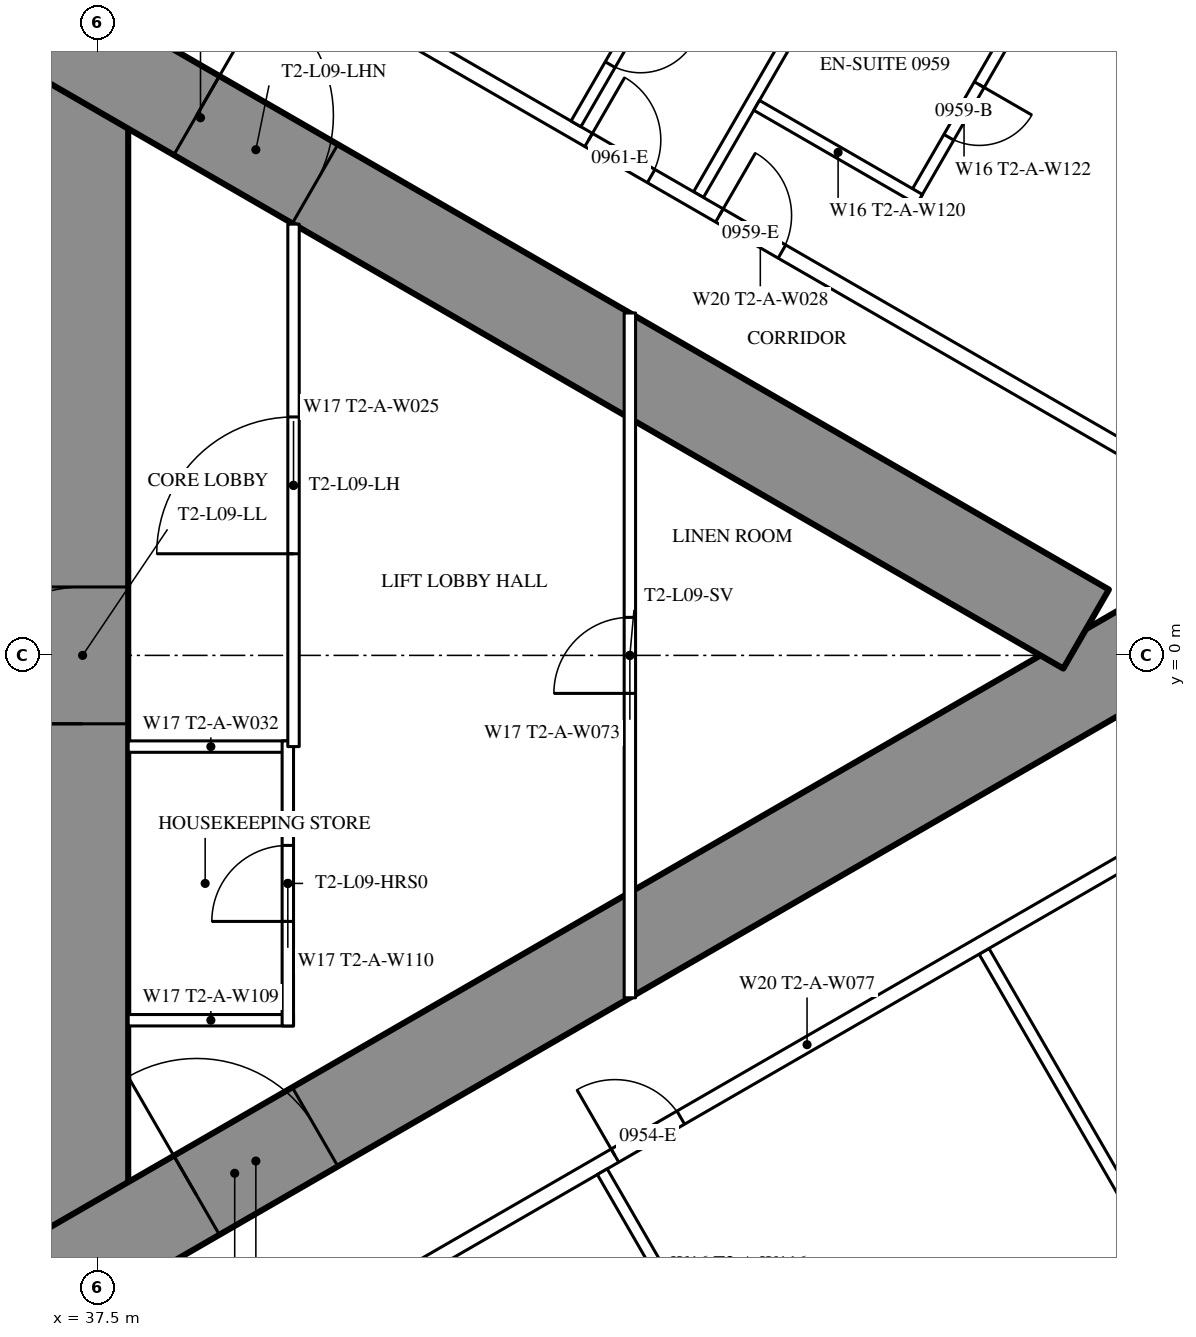
"""IFC4 building model, lengths in metres.
Left out: names, types, materials, properties, quantities, classifications, styles, units other than length and angle.
Written with IfcOpenShell. Run it as: python <this file> out.ifc"""

import sys

from ifc_helpers import new_model, si_unit, direction, frame, frame_2d, origin, place, context, subcontext, project, spatial, rectangle, extrude, element, fill, save


model = new_model("IFC4")
c1 = context("Model", 3, precision=1e-05, world=origin(), true_north=direction((0.0, 1.0)))
c2 = subcontext(c1, "Body", "Model", "MODEL_VIEW")
j1 = project(units=[si_unit("LENGTHUNIT", "METRE"), si_unit("PLANEANGLEUNIT", "RADIAN")], contexts=[c1])
p1 = place(None, origin())
s1 = spatial("IfcSite", under=j1, at=p1, CompositionType="ELEMENT")
p2 = place(p1, origin())
s2 = spatial("IfcBuilding", under=s1, at=p2, CompositionType="ELEMENT")
p3 = place(p2, frame((0.0, 0.0, 39.0)))
s3 = spatial("IfcBuildingStorey", under=s2, at=p3, CompositionType="ELEMENT", Elevation=39.0)
p4 = place(p3, frame((37.3, -8.6, 0.0), z_axis=(0.0, 0.0, 1.0), x_axis=(0.0, 1.0, 0.0)))
e1 = element("IfcWall", 1, at=p4, inside=s3, PredefinedType="SHEAR", context=c2, shape_type="SweptSolid", body=[
    extrude(rectangle(XDim=17.2, YDim=1.2, at=frame_2d((8.6, 0.0))), origin(), (0.0, 0.0, 1.0), 3.5),
])
p5 = place(p4, frame((7.7, 0.0, 0.0)))
e2 = element("IfcOpeningElement", 2, at=p5, cuts=e1, PredefinedType="OPENING", context=c2, shape_type="SweptSolid", body=[
    extrude(rectangle(XDim=1.8, YDim=2.2, at=frame_2d((0.9, 1.1))), frame((0.0, 0.61, 0.0), z_axis=(0.0, -1.0, 0.0), x_axis=(1.0, 0.0, 0.0)), (0.0, 0.0, 1.0), 1.22),
])
p6 = place(p3, frame((27.2, -13.8, 0.0), z_axis=(0.0, 0.0, 1.0), x_axis=(0.866027159892, 0.499996958321, 0.0)))
e3 = element("IfcWall", 3, at=p6, inside=s3, PredefinedType="SHEAR", context=c2, shape_type="SweptSolid", body=[
    extrude(rectangle(XDim=27.947, YDim=1.2, at=frame_2d((13.973, 0.0))), origin(), (0.0, 0.0, 1.0), 3.5),
])
p7 = place(p6, frame((4.6, 0.0, 0.0)))
e4 = element("IfcOpeningElement", 4, at=p7, cuts=e3, PredefinedType="OPENING", context=c2, shape_type="SweptSolid", body=[
    extrude(rectangle(XDim=1.0, YDim=2.2, at=frame_2d((0.5, 1.1))), frame((0.0, 0.61, 0.0), z_axis=(0.0, -1.0, 0.0), x_axis=(1.0, 0.0, 0.0)), (0.0, 0.0, 1.0), 1.22),
])
p8 = place(p6, frame((13.395, 0.0, 0.0)))
e5 = element("IfcOpeningElement", 5, at=p8, cuts=e3, PredefinedType="OPENING", context=c2, shape_type="SweptSolid", body=[
    extrude(rectangle(XDim=1.8, YDim=2.2, at=frame_2d((0.9, 1.1))), frame((0.0, 0.61, 0.0), z_axis=(0.0, -1.0, 0.0), x_axis=(1.0, 0.0, 0.0)), (0.0, 0.0, 1.0), 1.22),
])
p9 = place(p3, frame((27.2, 13.8, 0.0), z_axis=(0.0, 0.0, 1.0), x_axis=(0.866024515034, -0.500001539357, 0.0)))
e6 = element("IfcWall", 6, at=p9, inside=s3, PredefinedType="SHEAR", context=c2, shape_type="SweptSolid", body=[
    extrude(rectangle(XDim=26.907, YDim=1.2, at=frame_2d((13.454, 0.0))), origin(), (0.0, 0.0, 1.0), 3.5),
])
p10 = place(p9, frame((4.6, 0.0, 0.0)))
e7 = element("IfcOpeningElement", 7, at=p10, cuts=e6, PredefinedType="OPENING", context=c2, shape_type="SweptSolid", body=[
    extrude(rectangle(XDim=1.0, YDim=2.2, at=frame_2d((0.5, 1.1))), frame((0.0, 0.61, 0.0), z_axis=(0.0, -1.0, 0.0), x_axis=(1.0, 0.0, 0.0)), (0.0, 0.0, 1.0), 1.22),
])
p11 = place(p9, frame((13.395, 0.0, 0.0)))
e8 = element("IfcOpeningElement", 8, at=p11, cuts=e6, PredefinedType="OPENING", context=c2, shape_type="SweptSolid", body=[
    extrude(rectangle(XDim=1.8, YDim=2.2, at=frame_2d((0.9, 1.1))), frame((0.0, 0.61, 0.0), z_axis=(0.0, -1.0, 0.0), x_axis=(1.0, 0.0, 0.0)), (0.0, 0.0, 1.0), 1.22),
])
p12 = place(p3, frame((49.159, -3.893, 0.0), z_axis=(0.0, 0.0, 1.0), x_axis=(0.499998773722, -0.866026111775, 0.0)))
e9 = element("IfcWall", 9, at=p12, inside=s3, PredefinedType="PARTITIONING", context=c2, shape_type="SweptSolid", body=[
    extrude(rectangle(XDim=9.892, YDim=0.15, at=frame_2d((4.946, 0.0))), origin(), (0.0, 0.0, 1.0), 2.25),
])
p13 = place(p3, frame((45.403, 6.062, 0.0), z_axis=(0.0, 0.0, 1.0), x_axis=(0.500013434677, 0.866017647131, 0.0)))
e10 = element("IfcWall", 10, at=p13, inside=s3, PredefinedType="PARTITIONING", context=c2, shape_type="SweptSolid", body=[
    extrude(rectangle(XDim=9.902, YDim=0.15, at=frame_2d((4.951, 0.0))), origin(), (0.0, 0.0, 1.0), 2.25),
])
p14 = place(p3, frame((37.96, -10.243, 0.0), z_axis=(0.0, 0.0, 1.0), x_axis=(0.866026429433, 0.499998223521, 0.0)))
e11 = element("IfcWall", 11, at=p14, inside=s3, PredefinedType="PARTITIONING", context=c2, shape_type="SweptSolid", body=[
    extrude(rectangle(XDim=20.487, YDim=0.2, at=frame_2d((10.243, 0.0))), origin(), (0.0, 0.0, 1.0), 3.25),
])
p15 = place(p14, frame((7.325, 0.0, 0.0)))
e12 = element("IfcOpeningElement", 12, at=p15, cuts=e11, PredefinedType="OPENING", context=c2, shape_type="SweptSolid", body=[
    extrude(rectangle(XDim=1.0, YDim=2.2, at=frame_2d((0.5, 1.1))), frame((0.0, 0.11, 0.0), z_axis=(0.0, -1.0, 0.0), x_axis=(1.0, 0.0, 0.0)), (0.0, 0.0, 1.0), 0.22),
])
p16 = place(p14, frame((18.937, 0.0, 0.0)))
e13 = element("IfcOpeningElement", 13, at=p16, cuts=e11, PredefinedType="OPENING", context=c2, shape_type="SweptSolid", body=[
    extrude(rectangle(XDim=0.95, YDim=2.2, at=frame_2d((0.475, 1.1))), frame((0.0, 0.11, 0.0), z_axis=(0.0, -1.0, 0.0), x_axis=(1.0, 0.0, 0.0)), (0.0, 0.0, 1.0), 0.22),
])
p17 = place(p14, frame((0.6, 0.0, 0.0)))
e14 = element("IfcOpeningElement", 14, at=p17, cuts=e11, PredefinedType="OPENING", context=c2, shape_type="SweptSolid", body=[
    extrude(rectangle(XDim=0.95, YDim=2.2, at=frame_2d((0.475, 1.1))), frame((0.0, 0.11, 0.0), z_axis=(0.0, -1.0, 0.0), x_axis=(1.0, 0.0, 0.0)), (0.0, 0.0, 1.0), 0.22),
])
p18 = place(p3, frame((36.834, 10.894, 0.0), z_axis=(0.0, 0.0, 1.0), x_axis=(0.866028157229, -0.499995230863, 0.0)))
e15 = element("IfcWall", 15, at=p18, inside=s3, PredefinedType="PARTITIONING", context=c2, shape_type="SweptSolid", body=[
    extrude(rectangle(XDim=21.667, YDim=0.2, at=frame_2d((10.833, 0.0))), origin(), (0.0, 0.0, 1.0), 3.25),
])
p19 = place(p18, frame((18.885, 0.0, 0.0)))
e16 = element("IfcOpeningElement", 16, at=p19, cuts=e15, PredefinedType="OPENING", context=c2, shape_type="SweptSolid", body=[
    extrude(rectangle(XDim=0.95, YDim=2.2, at=frame_2d((0.475, 1.1))), frame((0.0, 0.11, 0.0), z_axis=(0.0, -1.0, 0.0), x_axis=(1.0, 0.0, 0.0)), (0.0, 0.0, 1.0), 0.22),
])
p20 = place(p18, frame((10.212, 0.0, 0.0)))
e17 = element("IfcOpeningElement", 17, at=p20, cuts=e15, PredefinedType="OPENING", context=c2, shape_type="SweptSolid", body=[
    extrude(rectangle(XDim=0.95, YDim=2.2, at=frame_2d((0.475, 1.1))), frame((0.0, 0.11, 0.0), z_axis=(0.0, -1.0, 0.0), x_axis=(1.0, 0.0, 0.0)), (0.0, 0.0, 1.0), 0.22),
])
p21 = place(p18, frame((8.225, 0.0, 0.0)))
e18 = element("IfcOpeningElement", 18, at=p21, cuts=e15, PredefinedType="OPENING", context=c2, shape_type="SweptSolid", body=[
    extrude(rectangle(XDim=0.95, YDim=2.2, at=frame_2d((0.475, 1.1))), frame((0.0, 0.11, 0.0), z_axis=(0.0, -1.0, 0.0), x_axis=(1.0, 0.0, 0.0)), (0.0, 0.0, 1.0), 0.22),
])
p22 = place(p18, frame((1.825, 0.0, 0.0)))
e19 = element("IfcOpeningElement", 19, at=p22, cuts=e15, PredefinedType="OPENING", context=c2, shape_type="SweptSolid", body=[
    extrude(rectangle(XDim=0.95, YDim=2.2, at=frame_2d((0.475, 1.1))), frame((0.0, 0.11, 0.0), z_axis=(0.0, -1.0, 0.0), x_axis=(1.0, 0.0, 0.0)), (0.0, 0.0, 1.0), 0.22),
])
p23 = place(p18, frame((0.246, 0.0, 0.0)))
e20 = element("IfcOpeningElement", 20, at=p23, cuts=e15, PredefinedType="OPENING", context=c2, shape_type="SweptSolid", body=[
    extrude(rectangle(XDim=0.9, YDim=2.2, at=frame_2d((0.45, 1.1))), frame((0.0, 0.11, 0.0), z_axis=(0.0, -1.0, 0.0), x_axis=(1.0, 0.0, 0.0)), (0.0, 0.0, 1.0), 0.22),
])
p24 = place(p3, frame((44.137, -6.792, 0.0), z_axis=(0.0, 0.0, 1.0), x_axis=(0.49994636267, -0.866056369097, 0.0)))
e21 = element("IfcWall", 21, at=p24, inside=s3, PredefinedType="PARTITIONING", context=c2, shape_type="SweptSolid", body=[
    extrude(rectangle(XDim=2.8, YDim=0.15, at=frame_2d((1.4, 0.0))), origin(), (0.0, 0.0, 1.0), 3.25),
])
p25 = place(p24, frame((1.55, 0.0, 0.0)))
e22 = element("IfcOpeningElement", 22, at=p25, cuts=e21, PredefinedType="OPENING", context=c2, shape_type="SweptSolid", body=[
    extrude(rectangle(XDim=1.0, YDim=2.2, at=frame_2d((0.5, 1.1))), frame((0.0, 0.085, 0.0), z_axis=(0.0, -1.0, 0.0), x_axis=(1.0, 0.0, 0.0)), (0.0, 0.0, 1.0), 0.17),
])
p26 = place(p3, frame((48.246, 6.037, 0.0), z_axis=(0.0, 0.0, 1.0), x_axis=(0.500006934395, 0.866021400173, 0.0)))
e23 = element("IfcWall", 23, at=p26, inside=s3, PredefinedType="PARTITIONING", context=c2, shape_type="SweptSolid", body=[
    extrude(rectangle(XDim=2.6, YDim=0.15, at=frame_2d((1.3, 0.0))), origin(), (0.0, 0.0, 1.0), 3.25),
])
p27 = place(p26, frame((0.9, 0.0, 0.0)))
e24 = element("IfcOpeningElement", 24, at=p27, cuts=e23, PredefinedType="OPENING", context=c2, shape_type="SweptSolid", body=[
    extrude(rectangle(XDim=0.8, YDim=2.2, at=frame_2d((0.4, 1.1))), frame((0.0, 0.085, 0.0), z_axis=(0.0, -1.0, 0.0), x_axis=(1.0, 0.0, 0.0)), (0.0, 0.0, 1.0), 0.17),
])
p28 = place(p3, frame((46.168, 7.237, 0.0), z_axis=(0.0, 0.0, 1.0), x_axis=(0.866006523861, -0.500032699561, 0.0)))
e25 = element("IfcWall", 25, at=p28, inside=s3, PredefinedType="PARTITIONING", context=c2, shape_type="SweptSolid", body=[
    extrude(rectangle(XDim=2.475, YDim=0.15, at=frame_2d((1.237, 0.0))), origin(), (0.0, 0.0, 1.0), 3.25),
])
p29 = place(p3, frame((43.791, 6.993, 0.0), z_axis=(0.0, 0.0, 1.0), x_axis=(0.500047596559, 0.865997922154, 0.0)))
e26 = element("IfcWall", 26, at=p29, inside=s3, PredefinedType="PARTITIONING", context=c2, shape_type="SweptSolid", body=[
    extrude(rectangle(XDim=2.6, YDim=0.15, at=frame_2d((1.3, 0.0))), origin(), (0.0, 0.0, 1.0), 3.25),
])
p30 = place(p29, frame((0.9, 0.0, 0.0)))
e27 = element("IfcOpeningElement", 27, at=p30, cuts=e26, PredefinedType="OPENING", context=c2, shape_type="SweptSolid", body=[
    extrude(rectangle(XDim=0.8, YDim=2.2, at=frame_2d((0.4, 1.1))), frame((0.0, 0.085, 0.0), z_axis=(0.0, -1.0, 0.0), x_axis=(1.0, 0.0, 0.0)), (0.0, 0.0, 1.0), 0.17),
])
for number, where, z_axis, x_axis in (
    (28, (37.9, -1.2, 0.0), (0.0, 0.0, 1.0), (1.0, 0.0, 0.0)),
    (29, (37.9, -4.8, 0.0), (0.0, 0.0, 1.0), (1.0, 0.0, 0.0)),
):
    element("IfcWall", number, at=place(p3, frame(where, z_axis=z_axis, x_axis=x_axis)), inside=s3, PredefinedType="PARTITIONING", context=c2, shape_type="SweptSolid", body=[
        extrude(rectangle(XDim=2.175, YDim=0.15, at=frame_2d((1.087, 0.0))), origin(), (0.0, 0.0, 1.0), 3.25),
    ])
p31 = place(p3, frame((40.0, -4.875, 0.0), z_axis=(0.0, 0.0, 1.0), x_axis=(0.0, 1.0, 0.0)))
e30 = element("IfcWall", 30, at=p31, inside=s3, PredefinedType="PARTITIONING", context=c2, shape_type="SweptSolid", body=[
    extrude(rectangle(XDim=3.75, YDim=0.15, at=frame_2d((1.875, 0.0))), origin(), (0.0, 0.0, 1.0), 3.25),
])
p32 = place(p31, frame((1.375, 0.0, 0.0)))
e31 = element("IfcOpeningElement", 31, at=p32, cuts=e30, PredefinedType="OPENING", context=c2, shape_type="SweptSolid", body=[
    extrude(rectangle(XDim=1.0, YDim=2.2, at=frame_2d((0.5, 1.1))), frame((0.0, 0.085, 0.0), z_axis=(0.0, -1.0, 0.0), x_axis=(1.0, 0.0, 0.0)), (0.0, 0.0, 1.0), 0.17),
])
p33 = place(p3, frame((40.075, -1.2, 0.0), z_axis=(0.0, 0.0, 1.0), x_axis=(0.0, 1.0, 0.0)))
e32 = element("IfcWall", 32, at=p33, inside=s3, PredefinedType="PARTITIONING", context=c2, shape_type="SweptSolid", body=[
    extrude(rectangle(XDim=6.874, YDim=0.15, at=frame_2d((3.437, 0.0))), origin(), (0.0, 0.0, 1.0), 3.25),
])
p34 = place(p33, frame((2.537, 0.0, 0.0)))
e33 = element("IfcOpeningElement", 33, at=p34, cuts=e32, PredefinedType="OPENING", context=c2, shape_type="SweptSolid", body=[
    extrude(rectangle(XDim=1.8, YDim=2.2, at=frame_2d((0.9, 1.1))), frame((0.0, 0.085, 0.0), z_axis=(0.0, -1.0, 0.0), x_axis=(1.0, 0.0, 0.0)), (0.0, 0.0, 1.0), 0.17),
])
p35 = place(p3, frame((44.5, -4.505, 0.0), z_axis=(0.0, 0.0, 1.0), x_axis=(0.0, 1.0, 0.0)))
e34 = element("IfcWall", 34, at=p35, inside=s3, PredefinedType="PARTITIONING", context=c2, shape_type="SweptSolid", body=[
    extrude(rectangle(XDim=9.009, YDim=0.15, at=frame_2d((4.505, 0.0))), origin(), (0.0, 0.0, 1.0), 2.45),
])
p36 = place(p35, frame((4.005, 0.0, 0.0)))
e35 = element("IfcOpeningElement", 35, at=p36, cuts=e34, PredefinedType="OPENING", context=c2, shape_type="SweptSolid", body=[
    extrude(rectangle(XDim=1.0, YDim=2.2, at=frame_2d((0.5, 1.1))), frame((0.0, 0.085, 0.0), z_axis=(0.0, -1.0, 0.0), x_axis=(1.0, 0.0, 0.0)), (0.0, 0.0, 1.0), 0.17),
])
p37 = place(p15, origin())
e36 = element("IfcDoor", 36, at=p37, inside=s3, OperationType="SINGLE_SWING_LEFT", PredefinedType="DOOR", context=c2, shape_type="SweptSolid", body=[
    extrude(rectangle(XDim=1.0, YDim=2.2, at=frame_2d((0.5, 1.1))), frame((0.0, 0.025, 0.0), z_axis=(0.0, -1.0, 0.0), x_axis=(1.0, 0.0, 0.0)), (0.0, 0.0, 1.0), 0.05),
])
fill(e12, e36)
p38 = place(p27, origin())
e37 = element("IfcDoor", 37, at=p38, inside=s3, OperationType="SINGLE_SWING_RIGHT", PredefinedType="DOOR", context=c2, shape_type="SweptSolid", body=[
    extrude(rectangle(XDim=0.8, YDim=2.2, at=frame_2d((0.4, 1.1))), frame((0.0, 0.025, 0.0), z_axis=(0.0, -1.0, 0.0), x_axis=(1.0, 0.0, 0.0)), (0.0, 0.0, 1.0), 0.05),
])
fill(e24, e37)
p39 = place(p20, origin())
e38 = element("IfcDoor", 38, at=p39, inside=s3, OperationType="SINGLE_SWING_LEFT", PredefinedType="DOOR", context=c2, shape_type="SweptSolid", body=[
    extrude(rectangle(XDim=0.95, YDim=2.2, at=frame_2d((0.475, 1.1))), frame((0.0, 0.025, 0.0), z_axis=(0.0, -1.0, 0.0), x_axis=(1.0, 0.0, 0.0)), (0.0, 0.0, 1.0), 0.05),
])
fill(e17, e38)
p40 = place(p30, origin())
e39 = element("IfcDoor", 39, at=p40, inside=s3, OperationType="SINGLE_SWING_RIGHT", PredefinedType="DOOR", context=c2, shape_type="SweptSolid", body=[
    extrude(rectangle(XDim=0.8, YDim=2.2, at=frame_2d((0.4, 1.1))), frame((0.0, 0.025, 0.0), z_axis=(0.0, -1.0, 0.0), x_axis=(1.0, 0.0, 0.0)), (0.0, 0.0, 1.0), 0.05),
])
fill(e27, e39)
p41 = place(p21, origin())
e40 = element("IfcDoor", 40, at=p41, inside=s3, OperationType="SINGLE_SWING_LEFT", PredefinedType="DOOR", context=c2, shape_type="SweptSolid", body=[
    extrude(rectangle(XDim=0.95, YDim=2.2, at=frame_2d((0.475, 1.1))), frame((0.0, 0.025, 0.0), z_axis=(0.0, -1.0, 0.0), x_axis=(1.0, 0.0, 0.0)), (0.0, 0.0, 1.0), 0.05),
])
fill(e18, e40)
p42 = place(p32, origin())
e41 = element("IfcDoor", 41, at=p42, inside=s3, OperationType="SINGLE_SWING_LEFT", PredefinedType="DOOR", context=c2, shape_type="SweptSolid", body=[
    extrude(rectangle(XDim=1.0, YDim=2.2, at=frame_2d((0.5, 1.1))), frame((0.0, 0.025, 0.0), z_axis=(0.0, -1.0, 0.0), x_axis=(1.0, 0.0, 0.0)), (0.0, 0.0, 1.0), 0.05),
])
fill(e31, e41)
p43 = place(p34, origin())
e42 = element("IfcDoor", 42, at=p43, inside=s3, OperationType="DOUBLE_DOOR_SINGLE_SWING", PredefinedType="DOOR", context=c2, shape_type="SweptSolid", body=[
    extrude(rectangle(XDim=1.8, YDim=2.2, at=frame_2d((0.9, 1.1))), frame((0.0, 0.025, 0.0), z_axis=(0.0, -1.0, 0.0), x_axis=(1.0, 0.0, 0.0)), (0.0, 0.0, 1.0), 0.05),
])
fill(e33, e42)
p44 = place(p36, origin())
e43 = element("IfcDoor", 43, at=p44, inside=s3, OperationType="SINGLE_SWING_LEFT", PredefinedType="DOOR", context=c2, shape_type="SweptSolid", body=[
    extrude(rectangle(XDim=1.0, YDim=2.2, at=frame_2d((0.5, 1.1))), frame((0.0, 0.025, 0.0), z_axis=(0.0, -1.0, 0.0), x_axis=(1.0, 0.0, 0.0)), (0.0, 0.0, 1.0), 0.05),
])
fill(e35, e43)
p45 = place(p8, origin())
e44 = element("IfcDoor", 44, at=p45, inside=s3, OperationType="DOUBLE_DOOR_SINGLE_SWING", PredefinedType="DOOR", context=c2, shape_type="SweptSolid", body=[
    extrude(rectangle(XDim=1.8, YDim=2.2, at=frame_2d((0.9, 1.1))), frame((0.0, 0.025, 0.0), z_axis=(0.0, -1.0, 0.0), x_axis=(1.0, 0.0, 0.0)), (0.0, 0.0, 1.0), 0.05),
])
fill(e5, e44)
p46 = place(p11, origin())
e45 = element("IfcDoor", 45, at=p46, inside=s3, OperationType="DOUBLE_DOOR_SINGLE_SWING", PredefinedType="DOOR", context=c2, shape_type="SweptSolid", body=[
    extrude(rectangle(XDim=1.8, YDim=2.2, at=frame_2d((0.9, 1.1))), frame((0.0, 0.025, 0.0), z_axis=(0.0, -1.0, 0.0), x_axis=(1.0, 0.0, 0.0)), (0.0, 0.0, 1.0), 0.05),
])
fill(e8, e45)
p47 = place(p5, origin())
e46 = element("IfcDoor", 46, at=p47, inside=s3, OperationType="DOUBLE_DOOR_SINGLE_SWING", PredefinedType="DOOR", context=c2, shape_type="SweptSolid", body=[
    extrude(rectangle(XDim=1.8, YDim=2.2, at=frame_2d((0.9, 1.1))), frame((0.0, 0.025, 0.0), z_axis=(0.0, -1.0, 0.0), x_axis=(1.0, 0.0, 0.0)), (0.0, 0.0, 1.0), 0.05),
])
fill(e2, e46)
save(model, sys.argv[1])
